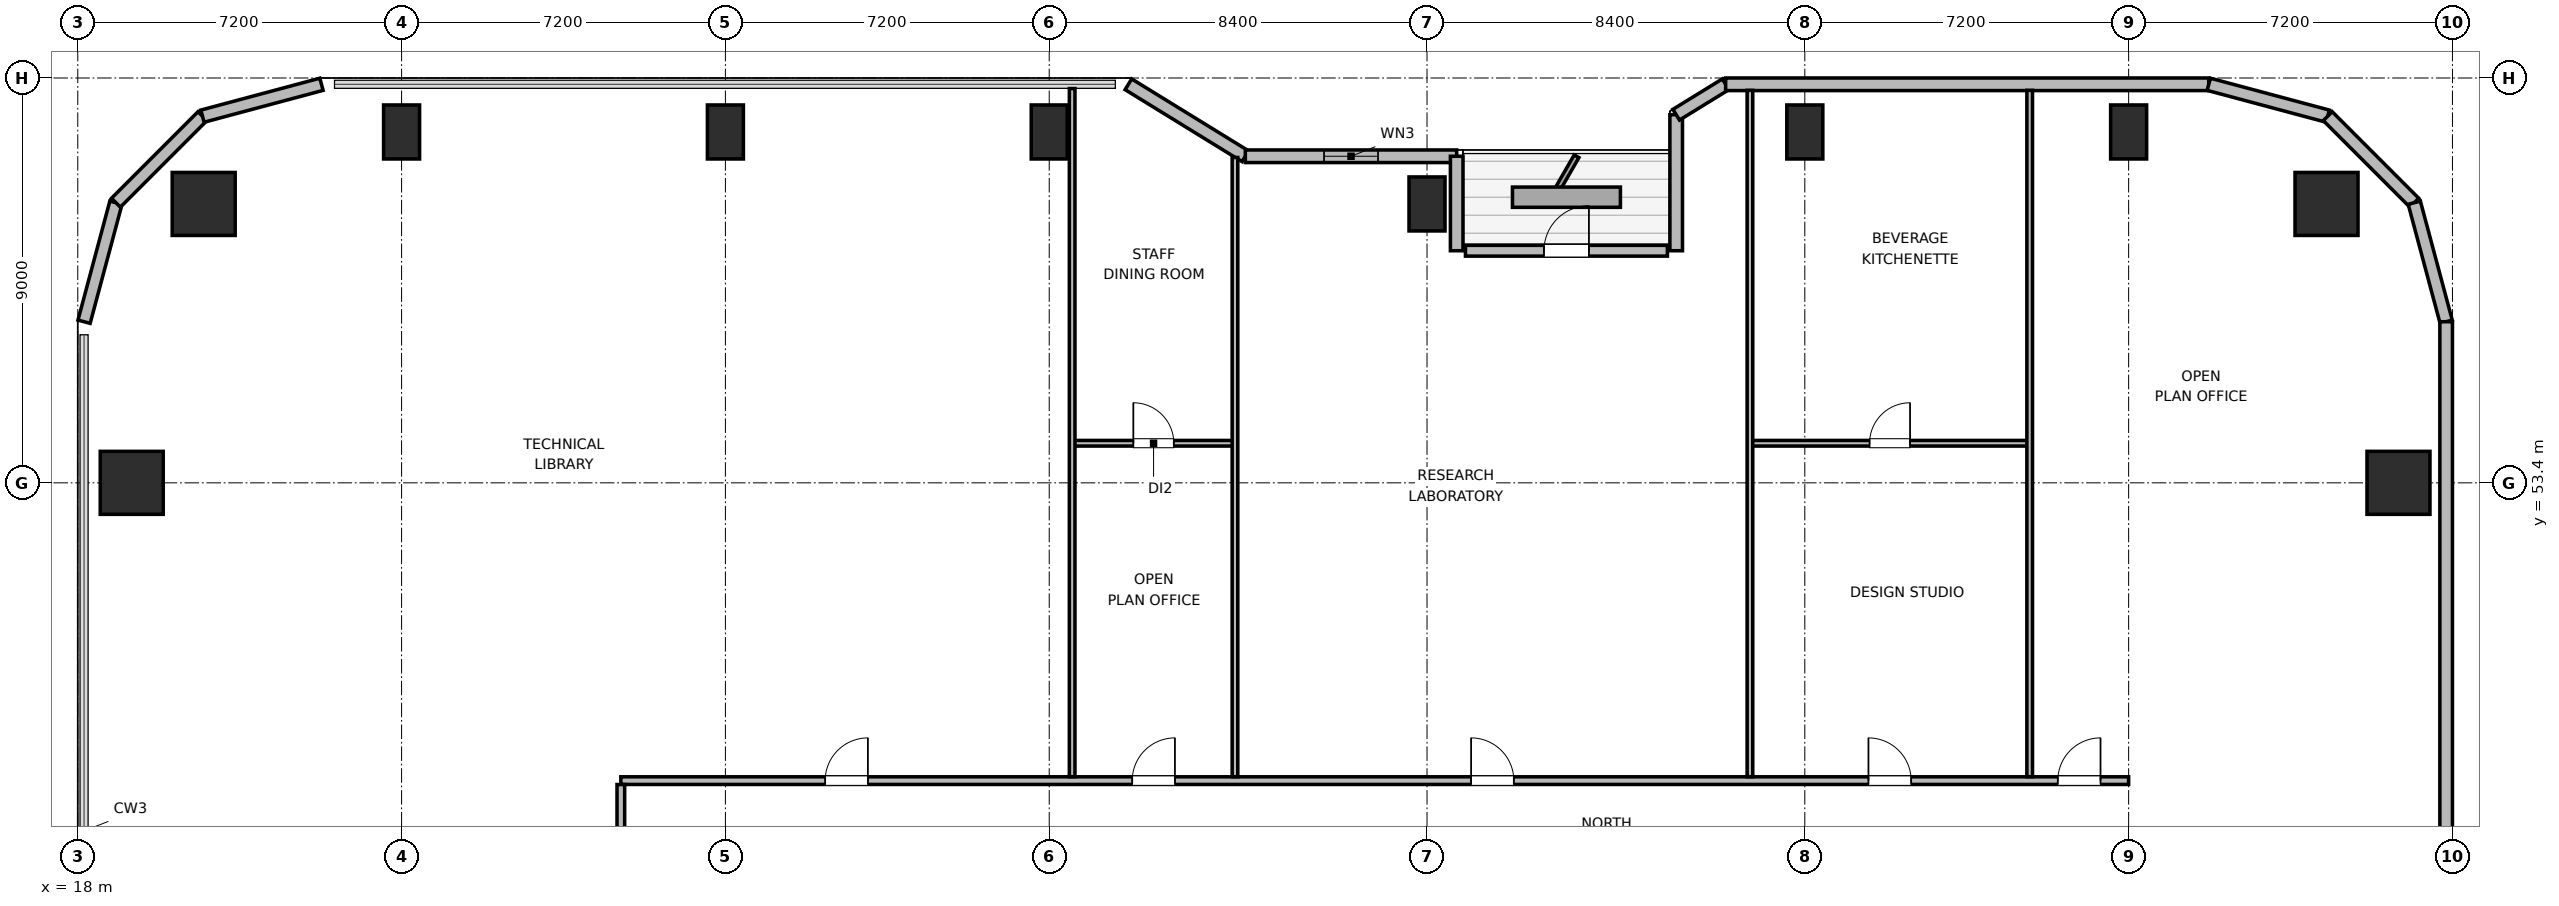
"""IFC4 building model, lengths in metres.
Left out: names, types, materials, properties, quantities, classifications, styles, units other than length and angle.
Written with IfcOpenShell. Run it as: python <this file> out.ifc"""

import sys

from ifc_helpers import new_model, si_unit, direction, frame, frame_2d, origin, origin_2d, place, context, subcontext, project, spatial, rectangle, circle, extrude, element, fill, save


model = new_model("IFC4")
c1 = context("Model", 3, precision=1e-05, world=origin(), true_north=direction((0.0, 1.0)))
c2 = subcontext(c1, "Body", "Model", "MODEL_VIEW")
j1 = project(units=[si_unit("LENGTHUNIT", "METRE"), si_unit("PLANEANGLEUNIT", "RADIAN")], contexts=[c1])
p1 = place(None, origin())
s1 = spatial("IfcSite", under=j1, at=p1, CompositionType="ELEMENT")
p2 = place(p1, origin())
s2 = spatial("IfcBuilding", under=s1, at=p2, CompositionType="ELEMENT")
p3 = place(p2, frame((0.0, 0.0, 154.5)))
s3 = spatial("IfcBuildingStorey", under=s2, at=p3, CompositionType="ELEMENT", Elevation=154.5)
for number, where, z_axis, x_axis in (
    (1, (68.0, 59.6, 0.0), (0.0, 0.0, 1.0), (1.0, 0.0, 0.0)),
    (2, (20.8, 59.6, 0.0), (0.0, 0.0, 1.0), (1.0, 0.0, 0.0)),
):
    element("IfcColumn", number, at=place(p3, frame(where, z_axis=z_axis, x_axis=x_axis)), inside=s3, PredefinedType="COLUMN", context=c2, shape_type="SweptSolid", body=[
        extrude(circle(Radius=0.7, at=origin_2d()), origin(), (0.0, 0.0, 1.0), 3.9),
    ])
for number, where, z_axis, x_axis in (
    (3, (25.2, 61.2, 0.0), (0.0, 0.0, 1.0), (1.0, 0.0, 0.0)),
    (4, (32.4, 61.2, 0.0), (0.0, 0.0, 1.0), (1.0, 0.0, 0.0)),
    (5, (39.6, 61.2, 0.0), (0.0, 0.0, 1.0), (1.0, 0.0, 0.0)),
    (6, (48.0, 59.6, 0.0), (0.0, 0.0, 1.0), (1.0, 0.0, 0.0)),
    (7, (56.4, 61.2, 0.0), (0.0, 0.0, 1.0), (1.0, 0.0, 0.0)),
    (8, (63.6, 61.2, 0.0), (0.0, 0.0, 1.0), (1.0, 0.0, 0.0)),
):
    element("IfcColumn", number, at=place(p3, frame(where, z_axis=z_axis, x_axis=x_axis)), inside=s3, PredefinedType="COLUMN", context=c2, shape_type="SweptSolid", body=[
        extrude(rectangle(XDim=0.8, YDim=1.2, at=origin_2d()), origin(), (0.0, 0.0, 1.0), 3.9),
    ])
for number, where, z_axis, x_axis in (
    (9, (19.2, 53.4, 0.0), (0.0, 0.0, 1.0), (1.0, 0.0, 0.0)),
    (10, (69.6, 53.4, 0.0), (0.0, 0.0, 1.0), (1.0, 0.0, 0.0)),
):
    element("IfcColumn", number, at=place(p3, frame(where, z_axis=z_axis, x_axis=x_axis)), inside=s3, PredefinedType="COLUMN", context=c2, shape_type="SweptSolid", body=[
        extrude(rectangle(XDim=1.4, YDim=1.4, at=origin_2d()), origin(), (0.0, 0.0, 1.0), 3.9),
    ])
p4 = place(p3, frame((18.14, 56.982, 0.0), z_axis=(0.0, 0.0, 1.0), x_axis=(0.258672222976, 0.9659651552, 0.0)))
e11 = element("IfcWall", 11, at=p4, inside=s3, PredefinedType="SOLIDWALL", context=c2, shape_type="SweptSolid", body=[
    extrude(rectangle(XDim=2.739, YDim=0.28, at=frame_2d((1.37, 0.0))), origin(), (0.0, 0.0, 1.0), 3.68),
])
p5 = place(p3, frame((18.848, 59.627, 0.0), z_axis=(0.0, 0.0, 1.0), x_axis=(0.707106781187, 0.707106781187, 0.0)))
e12 = element("IfcWall", 12, at=p5, inside=s3, PredefinedType="SOLIDWALL", context=c2, shape_type="SweptSolid", body=[
    extrude(rectangle(XDim=2.721, YDim=0.28, at=frame_2d((1.36, 0.0))), origin(), (0.0, 0.0, 1.0), 3.68),
])
p6 = place(p3, frame((20.772, 61.552, 0.0), z_axis=(0.0, 0.0, 1.0), x_axis=(0.965971118627, 0.258649952598, 0.0)))
e13 = element("IfcWall", 13, at=p6, inside=s3, PredefinedType="SOLIDWALL", context=c2, shape_type="SweptSolid", body=[
    extrude(rectangle(XDim=2.739, YDim=0.28, at=frame_2d((1.37, 0.0))), origin(), (0.0, 0.0, 1.0), 3.68),
])
p7 = place(p3, frame((41.36, 62.26, 0.0), z_axis=(0.0, 0.0, 1.0), x_axis=(0.851652825334, -0.524106349037, 0.0)))
e14 = element("IfcWall", 14, at=p7, inside=s3, PredefinedType="SOLIDWALL", context=c2, shape_type="SweptSolid", body=[
    extrude(rectangle(XDim=3.053, YDim=0.28, at=frame_2d((1.526, 0.0))), origin(), (0.0, 0.0, 1.0), 2.265),
])
p8 = place(p3, frame((43.96, 60.66, 0.0), z_axis=(0.0, 0.0, 1.0), x_axis=(1.0, 0.0, 0.0)))
e15 = element("IfcWall", 15, at=p8, inside=s3, PredefinedType="SOLIDWALL", context=c2, shape_type="SweptSolid", body=[
    extrude(rectangle(XDim=4.699, YDim=0.28, at=frame_2d((2.35, 0.0))), origin(), (0.0, 0.0, 1.0), 2.265),
])
p9 = place(p8, frame((1.75, 0.0, 0.85)))
e16 = element("IfcOpeningElement", 16, at=p9, cuts=e15, PredefinedType="OPENING", context=c2, shape_type="SweptSolid", body=[
    extrude(rectangle(XDim=1.2, YDim=1.1, at=frame_2d((0.6, 0.55))), frame((0.0, 0.15, 0.0), z_axis=(0.0, -1.0, 0.0), x_axis=(1.0, 0.0, 0.0)), (0.0, 0.0, 1.0), 0.3),
])
p10 = place(p3, frame((48.66, 60.66, 0.0), z_axis=(0.0, 0.0, 1.0), x_axis=(0.0, -1.0, 0.0)))
e17 = element("IfcWall", 17, at=p10, inside=s3, PredefinedType="SOLIDWALL", context=c2, shape_type="SweptSolid", body=[
    extrude(rectangle(XDim=2.1, YDim=0.28, at=frame_2d((1.05, 0.0))), origin(), (0.0, 0.0, 1.0), 2.265),
])
p11 = place(p3, frame((48.855, 58.56, 0.0), z_axis=(0.0, 0.0, 1.0), x_axis=(1.0, 0.0, 0.0)))
e18 = element("IfcWall", 18, at=p11, inside=s3, PredefinedType="SOLIDWALL", context=c2, shape_type="SweptSolid", body=[
    extrude(rectangle(XDim=4.49, YDim=0.24, at=frame_2d((2.245, 0.0))), origin(), (0.0, 0.0, 1.0), 3.68),
])
p12 = place(p11, frame((1.745, 0.0, 0.0)))
e19 = element("IfcOpeningElement", 19, at=p12, cuts=e18, PredefinedType="OPENING", context=c2, shape_type="SweptSolid", body=[
    extrude(rectangle(XDim=1.0, YDim=2.02, at=frame_2d((0.5, 1.01))), frame((0.0, 0.13, 0.0), z_axis=(0.0, -1.0, 0.0), x_axis=(1.0, 0.0, 0.0)), (0.0, 0.0, 1.0), 0.26),
])
p13 = place(p3, frame((53.54, 58.56, 0.0), z_axis=(0.0, 0.0, 1.0), x_axis=(0.0, 1.0, 0.0)))
e20 = element("IfcWall", 20, at=p13, inside=s3, PredefinedType="SOLIDWALL", context=c2, shape_type="SweptSolid", body=[
    extrude(rectangle(XDim=3.024, YDim=0.28, at=frame_2d((1.512, 0.0))), origin(), (0.0, 0.0, 1.0), 2.265),
])
p14 = place(p3, frame((53.54, 61.584, 0.0), z_axis=(0.0, 0.0, 1.0), x_axis=(0.851801140441, 0.523865266212, 0.0)))
e21 = element("IfcWall", 21, at=p14, inside=s3, PredefinedType="SOLIDWALL", context=c2, shape_type="SweptSolid", body=[
    extrude(rectangle(XDim=1.291, YDim=0.28, at=frame_2d((0.646, 0.0))), origin(), (0.0, 0.0, 1.0), 3.68),
])
p15 = place(p3, frame((54.64, 62.26, 0.0), z_axis=(0.0, 0.0, 1.0), x_axis=(1.0, 0.0, 0.0)))
e22 = element("IfcWall", 22, at=p15, inside=s3, PredefinedType="SOLIDWALL", context=c2, shape_type="SweptSolid", body=[
    extrude(rectangle(XDim=10.742, YDim=0.28, at=frame_2d((5.371, 0.0))), origin(), (0.0, 0.0, 1.0), 3.68),
])
p16 = place(p3, frame((65.382, 62.26, 0.0), z_axis=(0.0, 0.0, 1.0), x_axis=(0.965971118627, -0.258649952598, 0.0)))
e23 = element("IfcWall", 23, at=p16, inside=s3, PredefinedType="SOLIDWALL", context=c2, shape_type="SweptSolid", body=[
    extrude(rectangle(XDim=2.739, YDim=0.28, at=frame_2d((1.37, 0.0))), origin(), (0.0, 0.0, 1.0), 3.68),
])
p17 = place(p3, frame((68.028, 61.552, 0.0), z_axis=(0.0, 0.0, 1.0), x_axis=(0.707061915429, -0.707151644098, 0.0)))
e24 = element("IfcWall", 24, at=p17, inside=s3, PredefinedType="SOLIDWALL", context=c2, shape_type="SweptSolid", body=[
    extrude(rectangle(XDim=2.721, YDim=0.28, at=frame_2d((1.36, 0.0))), origin(), (0.0, 0.0, 1.0), 3.68),
])
p18 = place(p3, frame((69.951, 59.627, 0.0), z_axis=(0.0, 0.0, 1.0), x_axis=(0.258672222976, -0.9659651552, 0.0)))
e25 = element("IfcWall", 25, at=p18, inside=s3, PredefinedType="SOLIDWALL", context=c2, shape_type="SweptSolid", body=[
    extrude(rectangle(XDim=2.739, YDim=0.28, at=frame_2d((1.37, 0.0))), origin(), (0.0, 0.0, 1.0), 3.68),
])
p19 = place(p3, frame((70.66, 56.982, 0.0), z_axis=(0.0, 0.0, 1.0), x_axis=(0.0, -1.0, 0.0)))
e26 = element("IfcWall", 26, at=p19, inside=s3, PredefinedType="SOLIDWALL", context=c2, shape_type="SweptSolid", body=[
    extrude(rectangle(XDim=14.242, YDim=0.28, at=frame_2d((7.121, 0.0))), origin(), (0.0, 0.0, 1.0), 3.68),
])
p20 = place(p3, frame((30.075, 46.78, 0.0), z_axis=(0.0, 0.0, 1.0), x_axis=(1.0, 0.0, 0.0)))
e27 = element("IfcWall", 27, at=p20, inside=s3, PredefinedType="PARTITIONING", context=c2, shape_type="SweptSolid", body=[
    extrude(rectangle(XDim=33.525, YDim=0.17, at=frame_2d((16.763, 0.0))), origin(), (0.0, 0.0, 1.0), 3.68),
])
p21 = place(p20, frame((4.543, 0.0, 0.0)))
e28 = element("IfcOpeningElement", 28, at=p21, cuts=e27, PredefinedType="OPENING", context=c2, shape_type="SweptSolid", body=[
    extrude(rectangle(XDim=0.95, YDim=2.04, at=frame_2d((0.475, 1.02))), frame((0.0, 0.095, 0.0), z_axis=(0.0, -1.0, 0.0), x_axis=(1.0, 0.0, 0.0)), (0.0, 0.0, 1.0), 0.19),
])
p22 = place(p20, frame((11.37, 0.0, 0.0)))
e29 = element("IfcOpeningElement", 29, at=p22, cuts=e27, PredefinedType="OPENING", context=c2, shape_type="SweptSolid", body=[
    extrude(rectangle(XDim=0.95, YDim=2.04, at=frame_2d((0.475, 1.02))), frame((0.0, 0.095, 0.0), z_axis=(0.0, -1.0, 0.0), x_axis=(1.0, 0.0, 0.0)), (0.0, 0.0, 1.0), 0.19),
])
p23 = place(p20, frame((18.905, 0.0, 0.0)))
e30 = element("IfcOpeningElement", 30, at=p23, cuts=e27, PredefinedType="OPENING", context=c2, shape_type="SweptSolid", body=[
    extrude(rectangle(XDim=0.95, YDim=2.04, at=frame_2d((0.475, 1.02))), frame((0.0, 0.095, 0.0), z_axis=(0.0, -1.0, 0.0), x_axis=(1.0, 0.0, 0.0)), (0.0, 0.0, 1.0), 0.19),
])
p24 = place(p20, frame((27.74, 0.0, 0.0)))
e31 = element("IfcOpeningElement", 31, at=p24, cuts=e27, PredefinedType="OPENING", context=c2, shape_type="SweptSolid", body=[
    extrude(rectangle(XDim=0.95, YDim=2.04, at=frame_2d((0.475, 1.02))), frame((0.0, 0.095, 0.0), z_axis=(0.0, -1.0, 0.0), x_axis=(1.0, 0.0, 0.0)), (0.0, 0.0, 1.0), 0.19),
])
p25 = place(p20, frame((31.95, 0.0, 0.0)))
e32 = element("IfcOpeningElement", 32, at=p25, cuts=e27, PredefinedType="OPENING", context=c2, shape_type="SweptSolid", body=[
    extrude(rectangle(XDim=0.95, YDim=2.04, at=frame_2d((0.475, 1.02))), frame((0.0, 0.095, 0.0), z_axis=(0.0, -1.0, 0.0), x_axis=(1.0, 0.0, 0.0)), (0.0, 0.0, 1.0), 0.19),
])
p26 = place(p3, frame((30.075, 37.1, 0.0), z_axis=(0.0, 0.0, 1.0), x_axis=(0.0, 1.0, 0.0)))
e33 = element("IfcWall", 33, at=p26, inside=s3, PredefinedType="PARTITIONING", context=c2, shape_type="SweptSolid", body=[
    extrude(rectangle(XDim=9.593, YDim=0.17, at=frame_2d((4.796, 0.0))), origin(), (0.0, 0.0, 1.0), 3.68),
])
p27 = place(p26, frame((4.365, 0.0, 0.0)))
e34 = element("IfcOpeningElement", 34, at=p27, cuts=e33, PredefinedType="OPENING", context=c2, shape_type="SweptSolid", body=[
    extrude(rectangle(XDim=0.95, YDim=2.04, at=frame_2d((0.475, 1.02))), frame((0.0, 0.095, 0.0), z_axis=(0.0, -1.0, 0.0), x_axis=(1.0, 0.0, 0.0)), (0.0, 0.0, 1.0), 0.19),
])
p28 = place(p3, frame((40.11, 54.28, 0.0), z_axis=(0.0, 0.0, 1.0), x_axis=(1.0, 0.0, 0.0)))
e35 = element("IfcWall", 35, at=p28, inside=s3, PredefinedType="PARTITIONING", context=c2, shape_type="SweptSolid", body=[
    extrude(rectangle(XDim=3.62, YDim=0.125, at=frame_2d((1.81, 0.0))), origin(), (0.0, 0.0, 1.0), 3.68),
])
p29 = place(p28, frame((1.36, 0.0, 0.0)))
e36 = element("IfcOpeningElement", 36, at=p29, cuts=e35, PredefinedType="OPENING", context=c2, shape_type="SweptSolid", body=[
    extrude(rectangle(XDim=0.9, YDim=2.02, at=frame_2d((0.45, 1.01))), frame((0.0, 0.073, 0.0), z_axis=(0.0, -1.0, 0.0), x_axis=(1.0, 0.0, 0.0)), (0.0, 0.0, 1.0), 0.145),
])
p30 = place(p3, frame((40.11, 46.867, 0.0), z_axis=(0.0, 0.0, 1.0), x_axis=(0.0, 1.0, 0.0)))
e37 = element("IfcWall", 37, at=p30, inside=s3, PredefinedType="PARTITIONING", context=c2, shape_type="SweptSolid", body=[
    extrude(rectangle(XDim=15.298, YDim=0.125, at=frame_2d((7.649, 0.0))), origin(), (0.0, 0.0, 1.0), 3.043),
])
p31 = place(p3, frame((43.73, 46.867, 0.0), z_axis=(0.0, 0.0, 1.0), x_axis=(0.0, 1.0, 0.0)))
e38 = element("IfcWall", 38, at=p31, inside=s3, PredefinedType="PARTITIONING", context=c2, shape_type="SweptSolid", body=[
    extrude(rectangle(XDim=13.766, YDim=0.125, at=frame_2d((6.883, 0.0))), origin(), (0.0, 0.0, 1.0), 3.043),
])
p32 = place(p3, frame((55.18, 54.28, 0.0), z_axis=(0.0, 0.0, 1.0), x_axis=(1.0, 0.0, 0.0)))
e39 = element("IfcWall", 39, at=p32, inside=s3, PredefinedType="PARTITIONING", context=c2, shape_type="SweptSolid", body=[
    extrude(rectangle(XDim=6.22, YDim=0.125, at=frame_2d((3.11, 0.0))), origin(), (0.0, 0.0, 1.0), 3.68),
])
p33 = place(p32, frame((2.66, 0.0, 0.0)))
e40 = element("IfcOpeningElement", 40, at=p33, cuts=e39, PredefinedType="OPENING", context=c2, shape_type="SweptSolid", body=[
    extrude(rectangle(XDim=0.9, YDim=2.02, at=frame_2d((0.45, 1.01))), frame((0.0, 0.073, 0.0), z_axis=(0.0, -1.0, 0.0), x_axis=(1.0, 0.0, 0.0)), (0.0, 0.0, 1.0), 0.145),
])
p34 = place(p3, frame((55.18, 46.867, 0.0), z_axis=(0.0, 0.0, 1.0), x_axis=(0.0, 1.0, 0.0)))
e41 = element("IfcWall", 41, at=p34, inside=s3, PredefinedType="PARTITIONING", context=c2, shape_type="SweptSolid", body=[
    extrude(rectangle(XDim=15.258, YDim=0.125, at=frame_2d((7.629, 0.0))), origin(), (0.0, 0.0, 1.0), 3.043),
])
p35 = place(p3, frame((61.4, 46.867, 0.0), z_axis=(0.0, 0.0, 1.0), x_axis=(0.0, 1.0, 0.0)))
e42 = element("IfcWall", 42, at=p35, inside=s3, PredefinedType="PARTITIONING", context=c2, shape_type="SweptSolid", body=[
    extrude(rectangle(XDim=15.258, YDim=0.125, at=frame_2d((7.629, 0.0))), origin(), (0.0, 0.0, 1.0), 3.68),
])
p36 = place(p9, origin())
e43 = element("IfcWindow", 43, at=p36, inside=s3, PartitioningType="SINGLE_PANEL", PredefinedType="WINDOW", context=c2, shape_type="SweptSolid", body=[
    extrude(rectangle(XDim=1.2, YDim=1.1, at=frame_2d((0.6, 0.55))), frame((0.0, 0.03, 0.0), z_axis=(0.0, -1.0, 0.0), x_axis=(1.0, 0.0, 0.0)), (0.0, 0.0, 1.0), 0.06),
])
fill(e16, e43)
p37 = place(p12, origin())
e44 = element("IfcDoor", 44, at=p37, inside=s3, OperationType="SINGLE_SWING_RIGHT", PredefinedType="DOOR", context=c2, shape_type="SweptSolid", body=[
    extrude(rectangle(XDim=1.0, YDim=2.02, at=frame_2d((0.5, 1.01))), frame((0.0, 0.025, 0.0), z_axis=(0.0, -1.0, 0.0), x_axis=(1.0, 0.0, 0.0)), (0.0, 0.0, 1.0), 0.05),
])
fill(e19, e44)
p38 = place(p21, origin())
e45 = element("IfcDoor", 45, at=p38, inside=s3, OperationType="SINGLE_SWING_RIGHT", PredefinedType="DOOR", context=c2, shape_type="SweptSolid", body=[
    extrude(rectangle(XDim=0.95, YDim=2.04, at=frame_2d((0.475, 1.02))), frame((0.0, 0.025, 0.0), z_axis=(0.0, -1.0, 0.0), x_axis=(1.0, 0.0, 0.0)), (0.0, 0.0, 1.0), 0.05),
])
fill(e28, e45)
p39 = place(p29, origin())
e46 = element("IfcDoor", 46, at=p39, inside=s3, OperationType="SINGLE_SWING_LEFT", PredefinedType="DOOR", context=c2, shape_type="SweptSolid", body=[
    extrude(rectangle(XDim=0.9, YDim=2.02, at=frame_2d((0.45, 1.01))), frame((0.0, 0.025, 0.0), z_axis=(0.0, -1.0, 0.0), x_axis=(1.0, 0.0, 0.0)), (0.0, 0.0, 1.0), 0.05),
])
fill(e36, e46)
p40 = place(p22, origin())
e47 = element("IfcDoor", 47, at=p40, inside=s3, OperationType="SINGLE_SWING_RIGHT", PredefinedType="DOOR", context=c2, shape_type="SweptSolid", body=[
    extrude(rectangle(XDim=0.95, YDim=2.04, at=frame_2d((0.475, 1.02))), frame((0.0, 0.025, 0.0), z_axis=(0.0, -1.0, 0.0), x_axis=(1.0, 0.0, 0.0)), (0.0, 0.0, 1.0), 0.05),
])
fill(e29, e47)
p41 = place(p23, origin())
e48 = element("IfcDoor", 48, at=p41, inside=s3, OperationType="SINGLE_SWING_LEFT", PredefinedType="DOOR", context=c2, shape_type="SweptSolid", body=[
    extrude(rectangle(XDim=0.95, YDim=2.04, at=frame_2d((0.475, 1.02))), frame((0.0, 0.025, 0.0), z_axis=(0.0, -1.0, 0.0), x_axis=(1.0, 0.0, 0.0)), (0.0, 0.0, 1.0), 0.05),
])
fill(e30, e48)
p42 = place(p33, origin())
e49 = element("IfcDoor", 49, at=p42, inside=s3, OperationType="SINGLE_SWING_RIGHT", PredefinedType="DOOR", context=c2, shape_type="SweptSolid", body=[
    extrude(rectangle(XDim=0.9, YDim=2.02, at=frame_2d((0.45, 1.01))), frame((0.0, 0.025, 0.0), z_axis=(0.0, -1.0, 0.0), x_axis=(1.0, 0.0, 0.0)), (0.0, 0.0, 1.0), 0.05),
])
fill(e40, e49)
p43 = place(p24, origin())
e50 = element("IfcDoor", 50, at=p43, inside=s3, OperationType="SINGLE_SWING_LEFT", PredefinedType="DOOR", context=c2, shape_type="SweptSolid", body=[
    extrude(rectangle(XDim=0.95, YDim=2.04, at=frame_2d((0.475, 1.02))), frame((0.0, 0.025, 0.0), z_axis=(0.0, -1.0, 0.0), x_axis=(1.0, 0.0, 0.0)), (0.0, 0.0, 1.0), 0.05),
])
fill(e31, e50)
p44 = place(p25, origin())
e51 = element("IfcDoor", 51, at=p44, inside=s3, OperationType="SINGLE_SWING_RIGHT", PredefinedType="DOOR", context=c2, shape_type="SweptSolid", body=[
    extrude(rectangle(XDim=0.95, YDim=2.04, at=frame_2d((0.475, 1.02))), frame((0.0, 0.025, 0.0), z_axis=(0.0, -1.0, 0.0), x_axis=(1.0, 0.0, 0.0)), (0.0, 0.0, 1.0), 0.05),
])
fill(e32, e51)
save(model, sys.argv[1])
